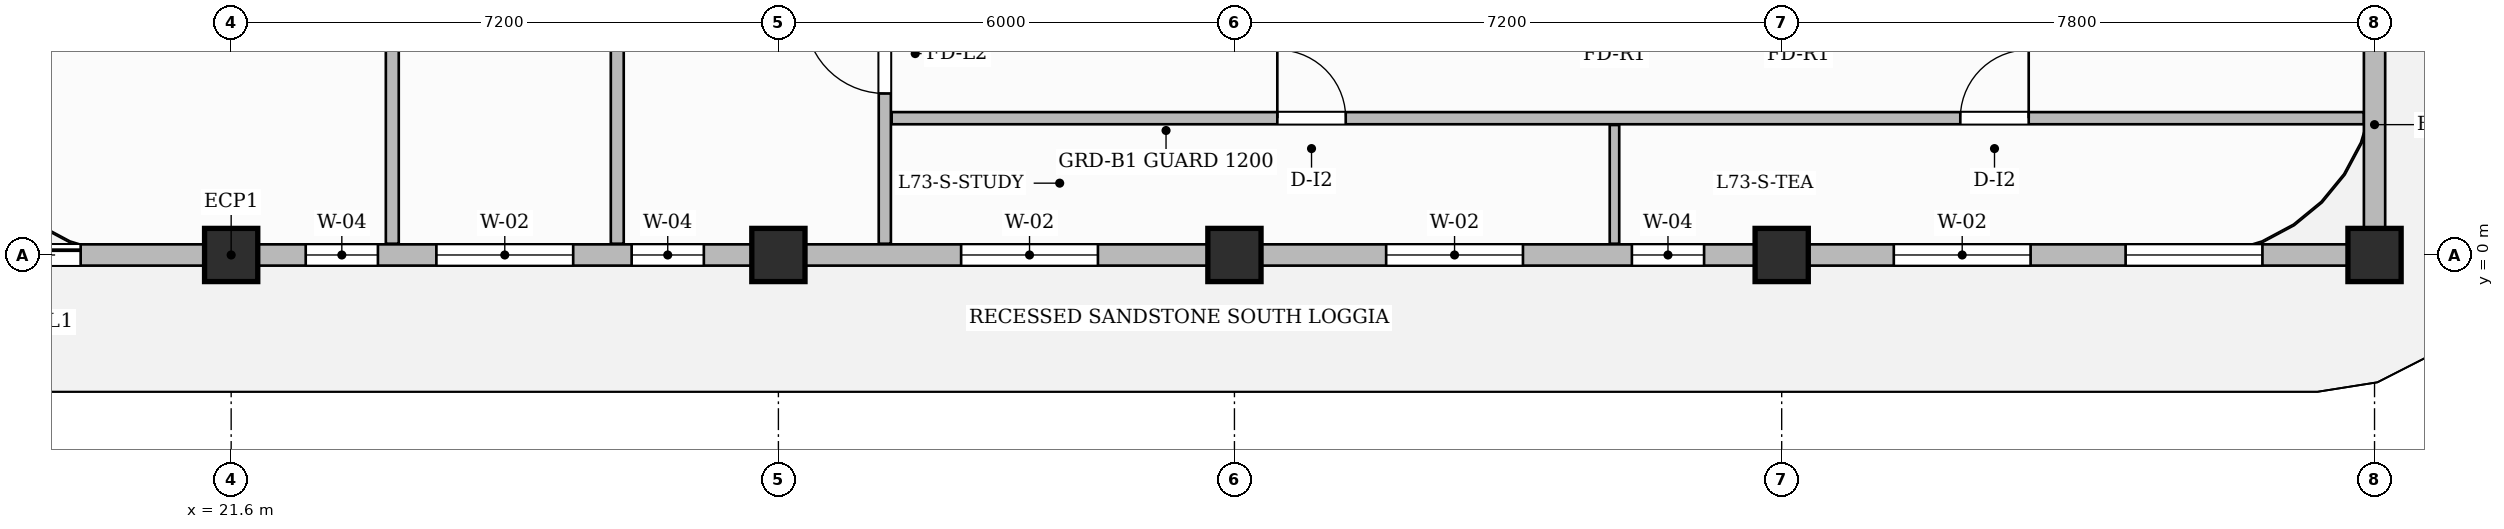
"""IFC4 building model, lengths in metres.
Left out: names, types, materials, properties, quantities, classifications, styles, units other than length and angle.
Written with IfcOpenShell. Run it as: python <this file> out.ifc"""

import sys

from ifc_helpers import new_model, si_unit, direction, frame, frame_2d, origin, origin_2d, place, context, subcontext, project, spatial, rectangle, extrude, source, transform, mapped, element, fill, save


model = new_model("IFC4")
c1 = context("Model", 3, precision=1e-05, world=origin(), true_north=direction((0.0, 1.0)))
c2 = subcontext(c1, "Body", "Model", "MODEL_VIEW")
j1 = project(units=[si_unit("LENGTHUNIT", "METRE"), si_unit("PLANEANGLEUNIT", "RADIAN")], contexts=[c1])
p1 = place(None, origin())
s1 = spatial("IfcSite", under=j1, at=p1, CompositionType="ELEMENT")
p2 = place(p1, origin())
s2 = spatial("IfcBuilding", under=s1, at=p2, CompositionType="ELEMENT")
p3 = place(p2, frame((0.0, 0.0, 290.45)))
s3 = spatial("IfcBuildingStorey", under=s2, at=p3, CompositionType="ELEMENT", Elevation=290.45)
m1 = source(origin(), c2, "Body", "SweptSolid", [
    extrude(rectangle(XDim=0.7, YDim=0.7, at=origin_2d()), origin(), (0.0, 0.0, 1.0), 3.85),
])
for number, where, z_axis, x_axis in (
    (1, (21.6, 0.0, 0.0), (0.0, 0.0, 1.0), (1.0, 0.0, 0.0)),
    (2, (28.8, 0.0, 0.0), (0.0, 0.0, 1.0), (1.0, 0.0, 0.0)),
    (3, (34.8, 0.0, 0.0), (0.0, 0.0, 1.0), (1.0, 0.0, 0.0)),
    (4, (42.0, 0.0, 0.0), (0.0, 0.0, 1.0), (1.0, 0.0, 0.0)),
    (5, (49.8, 0.0, 0.0), (0.0, 0.0, 1.0), (1.0, 0.0, 0.0)),
):
    element("IfcColumn", number, at=place(p3, frame(where, z_axis=z_axis, x_axis=x_axis)), inside=s3, PredefinedType="COLUMN", context=c2, shape_type="MappedRepresentation", body=[
        mapped(m1, transform((0.0, 0.0, 0.0), scale=1.0)),
    ])
p4 = place(p3, frame((30.2, 0.148, 0.0), z_axis=(0.0, 0.0, 1.0), x_axis=(0.0, 1.0, 0.0)))
e6 = element("IfcWall", 6, at=p4, inside=s3, PredefinedType="PARTITIONING", context=c2, shape_type="SweptSolid", body=[
    extrude(rectangle(XDim=8.912, YDim=0.16, at=frame_2d((4.456, 0.0))), origin(), (0.0, 0.0, 1.0), 3.55),
])
p5 = place(p4, frame((1.977, 0.0, 0.0)))
e7 = element("IfcOpeningElement", 7, at=p5, cuts=e6, PredefinedType="OPENING", context=c2, shape_type="SweptSolid", body=[
    extrude(rectangle(XDim=1.05, YDim=2.15, at=frame_2d((0.525, 1.075))), frame((0.0, 0.09, 0.0), z_axis=(0.0, -1.0, 0.0), x_axis=(1.0, 0.0, 0.0)), (0.0, 0.0, 1.0), 0.18),
])
p6 = place(p3, frame((30.29, 1.8, 0.0), z_axis=(0.0, 0.0, 1.0), x_axis=(1.0, 0.0, 0.0)))
e8 = element("IfcWall", 8, at=p6, inside=s3, PredefinedType="PARTITIONING", context=c2, shape_type="SweptSolid", body=[
    extrude(rectangle(XDim=19.37, YDim=0.16, at=frame_2d((9.685, 0.0))), origin(), (0.0, 0.0, 1.0), 3.55),
])
p7 = place(p6, frame((5.074, 0.0, 0.0)))
e9 = element("IfcOpeningElement", 9, at=p7, cuts=e8, PredefinedType="OPENING", context=c2, shape_type="SweptSolid", body=[
    extrude(rectangle(XDim=0.9, YDim=2.15, at=frame_2d((0.45, 1.075))), frame((0.0, 0.09, 0.0), z_axis=(0.0, -1.0, 0.0), x_axis=(1.0, 0.0, 0.0)), (0.0, 0.0, 1.0), 0.18),
])
p8 = place(p6, frame((14.06, 0.0, 0.0)))
e10 = element("IfcOpeningElement", 10, at=p8, cuts=e8, PredefinedType="OPENING", context=c2, shape_type="SweptSolid", body=[
    extrude(rectangle(XDim=0.9, YDim=2.15, at=frame_2d((0.45, 1.075))), frame((0.0, 0.09, 0.0), z_axis=(0.0, -1.0, 0.0), x_axis=(1.0, 0.0, 0.0)), (0.0, 0.0, 1.0), 0.18),
])
p9 = place(p3, frame((39.8, 0.148, 0.0), z_axis=(0.0, 0.0, 1.0), x_axis=(0.0, 1.0, 0.0)))
e11 = element("IfcWall", 11, at=p9, inside=s3, PredefinedType="PARTITIONING", context=c2, shape_type="SweptSolid", body=[
    extrude(rectangle(XDim=1.562, YDim=0.125, at=frame_2d((0.781, 0.0))), origin(), (0.0, 0.0, 1.0), 3.55),
])
for number, where, z_axis, x_axis in (
    (12, (23.72, 0.148, 0.0), (0.0, 0.0, 1.0), (0.0, 1.0, 0.0)),
    (13, (26.68, 0.148, 0.0), (0.0, 0.0, 1.0), (0.0, 1.0, 0.0)),
):
    element("IfcWall", number, at=place(p3, frame(where, z_axis=z_axis, x_axis=x_axis)), inside=s3, PredefinedType="PARTITIONING", context=c2, shape_type="SweptSolid", body=[
        extrude(rectangle(XDim=8.912, YDim=0.17, at=frame_2d((4.456, 0.0))), origin(), (0.0, 0.0, 1.0), 3.55),
    ])
p10 = place(p3, frame((18.0, 0.0, 0.0), z_axis=(0.0, 0.0, 1.0), x_axis=(1.0, 0.0, 0.0)))
e14 = element("IfcWall", 14, at=p10, inside=s3, PredefinedType="SOLIDWALL", context=c2, shape_type="SweptSolid", body=[
    extrude(rectangle(XDim=31.8, YDim=0.28, at=frame_2d((15.9, 0.0))), origin(), (0.0, 0.0, 1.0), 3.135),
])
p11 = place(p10, frame((0.42, 0.0, 0.0)))
e15 = element("IfcOpeningElement", 15, at=p11, cuts=e14, PredefinedType="OPENING", context=c2, shape_type="SweptSolid", body=[
    extrude(rectangle(XDim=1.2, YDim=2.2, at=frame_2d((0.6, 1.1))), frame((0.0, 0.15, 0.0), z_axis=(0.0, -1.0, 0.0), x_axis=(1.0, 0.0, 0.0)), (0.0, 0.0, 1.0), 0.3),
])
p12 = place(p10, frame((4.581, 0.0, 0.8)))
e16 = element("IfcOpeningElement", 16, at=p12, cuts=e14, PredefinedType="OPENING", context=c2, shape_type="SweptSolid", body=[
    extrude(rectangle(XDim=0.95, YDim=1.75, at=frame_2d((0.475, 0.875))), frame((0.0, 0.15, 0.0), z_axis=(0.0, -1.0, 0.0), x_axis=(1.0, 0.0, 0.0)), (0.0, 0.0, 1.0), 0.3),
])
p13 = place(p10, frame((6.3, 0.0, 0.8)))
e17 = element("IfcOpeningElement", 17, at=p13, cuts=e14, PredefinedType="OPENING", context=c2, shape_type="SweptSolid", body=[
    extrude(rectangle(XDim=1.8, YDim=1.85, at=frame_2d((0.9, 0.925))), frame((0.0, 0.15, 0.0), z_axis=(0.0, -1.0, 0.0), x_axis=(1.0, 0.0, 0.0)), (0.0, 0.0, 1.0), 0.3),
])
p14 = place(p10, frame((8.869, 0.0, 0.8)))
e18 = element("IfcOpeningElement", 18, at=p14, cuts=e14, PredefinedType="OPENING", context=c2, shape_type="SweptSolid", body=[
    extrude(rectangle(XDim=0.95, YDim=1.75, at=frame_2d((0.475, 0.875))), frame((0.0, 0.15, 0.0), z_axis=(0.0, -1.0, 0.0), x_axis=(1.0, 0.0, 0.0)), (0.0, 0.0, 1.0), 0.3),
])
p15 = place(p10, frame((13.204, 0.0, 0.8)))
e19 = element("IfcOpeningElement", 19, at=p15, cuts=e14, PredefinedType="OPENING", context=c2, shape_type="SweptSolid", body=[
    extrude(rectangle(XDim=1.8, YDim=1.85, at=frame_2d((0.9, 0.925))), frame((0.0, 0.15, 0.0), z_axis=(0.0, -1.0, 0.0), x_axis=(1.0, 0.0, 0.0)), (0.0, 0.0, 1.0), 0.3),
])
p16 = place(p10, frame((18.796, 0.0, 0.8)))
e20 = element("IfcOpeningElement", 20, at=p16, cuts=e14, PredefinedType="OPENING", context=c2, shape_type="SweptSolid", body=[
    extrude(rectangle(XDim=1.8, YDim=1.85, at=frame_2d((0.9, 0.925))), frame((0.0, 0.15, 0.0), z_axis=(0.0, -1.0, 0.0), x_axis=(1.0, 0.0, 0.0)), (0.0, 0.0, 1.0), 0.3),
])
p17 = place(p10, frame((22.029, 0.0, 0.8)))
e21 = element("IfcOpeningElement", 21, at=p17, cuts=e14, PredefinedType="OPENING", context=c2, shape_type="SweptSolid", body=[
    extrude(rectangle(XDim=0.95, YDim=1.75, at=frame_2d((0.475, 0.875))), frame((0.0, 0.15, 0.0), z_axis=(0.0, -1.0, 0.0), x_axis=(1.0, 0.0, 0.0)), (0.0, 0.0, 1.0), 0.3),
])
p18 = place(p10, frame((25.475, 0.0, 0.8)))
e22 = element("IfcOpeningElement", 22, at=p18, cuts=e14, PredefinedType="OPENING", context=c2, shape_type="SweptSolid", body=[
    extrude(rectangle(XDim=1.8, YDim=1.85, at=frame_2d((0.9, 0.925))), frame((0.0, 0.15, 0.0), z_axis=(0.0, -1.0, 0.0), x_axis=(1.0, 0.0, 0.0)), (0.0, 0.0, 1.0), 0.3),
])
p19 = place(p10, frame((28.525, 0.0, 0.8)))
e23 = element("IfcOpeningElement", 23, at=p19, cuts=e14, PredefinedType="OPENING", context=c2, shape_type="SweptSolid", body=[
    extrude(rectangle(XDim=1.8, YDim=1.85, at=frame_2d((0.9, 0.925))), frame((0.0, 0.15, 0.0), z_axis=(0.0, -1.0, 0.0), x_axis=(1.0, 0.0, 0.0)), (0.0, 0.0, 1.0), 0.3),
])
p20 = place(p3, frame((49.8, 0.05, 0.0), z_axis=(0.0, 0.0, 1.0), x_axis=(0.0, 1.0, 0.0)))
e24 = element("IfcWall", 24, at=p20, inside=s3, PredefinedType="SOLIDWALL", context=c2, shape_type="SweptSolid", body=[
    extrude(rectangle(XDim=3.33, YDim=0.28, at=frame_2d((1.665, 0.0))), origin(), (0.0, 0.0, 1.0), 3.55),
])
m2 = source(origin(), c2, "Body", "SweptSolid", [
    extrude(rectangle(XDim=1.05, YDim=2.15, at=frame_2d((0.525, 1.075))), frame((0.0, 0.025, 0.0), z_axis=(0.0, -1.0, 0.0), x_axis=(1.0, 0.0, 0.0)), (0.0, 0.0, 1.0), 0.05),
])
p21 = place(p5, origin())
e25 = element("IfcDoor", 25, at=p21, inside=s3, OperationType="SINGLE_SWING_RIGHT", PredefinedType="DOOR", context=c2, shape_type="MappedRepresentation", body=[
    mapped(m2, transform((0.0, 0.0, 0.0), scale=1.0)),
])
fill(e7, e25)
m3 = source(origin(), c2, "Body", "SweptSolid", [
    extrude(rectangle(XDim=0.9, YDim=2.15, at=frame_2d((0.45, 1.075))), frame((0.0, 0.025, 0.0), z_axis=(0.0, -1.0, 0.0), x_axis=(1.0, 0.0, 0.0)), (0.0, 0.0, 1.0), 0.05),
])
p22 = place(p7, origin())
e26 = element("IfcDoor", 26, at=p22, inside=s3, OperationType="SINGLE_SWING_LEFT", PredefinedType="DOOR", context=c2, shape_type="MappedRepresentation", body=[
    mapped(m3, transform((0.0, 0.0, 0.0), scale=1.0)),
])
fill(e9, e26)
p23 = place(p8, origin())
e27 = element("IfcDoor", 27, at=p23, inside=s3, OperationType="SINGLE_SWING_RIGHT", PredefinedType="DOOR", context=c2, shape_type="MappedRepresentation", body=[
    mapped(m3, transform((0.0, 0.0, 0.0), scale=1.0)),
])
fill(e10, e27)
m4 = source(origin(), c2, "Body", "SweptSolid", [
    extrude(rectangle(XDim=1.2, YDim=2.2, at=frame_2d((0.6, 1.1))), frame((0.0, 0.025, 0.0), z_axis=(0.0, -1.0, 0.0), x_axis=(1.0, 0.0, 0.0)), (0.0, 0.0, 1.0), 0.05),
])
p24 = place(p11, origin())
e28 = element("IfcDoor", 28, at=p24, inside=s3, OperationType="SLIDING_TO_LEFT", PredefinedType="DOOR", context=c2, shape_type="MappedRepresentation", body=[
    mapped(m4, transform((0.0, 0.0, 0.0), scale=1.0)),
])
fill(e15, e28)
m5 = source(origin(), c2, "Body", "SweptSolid", [
    extrude(rectangle(XDim=0.95, YDim=1.75, at=frame_2d((0.475, 0.875))), frame((0.0, 0.03, 0.0), z_axis=(0.0, -1.0, 0.0), x_axis=(1.0, 0.0, 0.0)), (0.0, 0.0, 1.0), 0.06),
])
p25 = place(p12, origin())
e29 = element("IfcWindow", 29, at=p25, inside=s3, PartitioningType="SINGLE_PANEL", PredefinedType="WINDOW", context=c2, shape_type="MappedRepresentation", body=[
    mapped(m5, transform((0.0, 0.0, 0.0), scale=1.0)),
])
fill(e16, e29)
m6 = source(origin(), c2, "Body", "SweptSolid", [
    extrude(rectangle(XDim=1.8, YDim=1.85, at=frame_2d((0.9, 0.925))), frame((0.0, 0.03, 0.0), z_axis=(0.0, -1.0, 0.0), x_axis=(1.0, 0.0, 0.0)), (0.0, 0.0, 1.0), 0.06),
])
p26 = place(p13, origin())
e30 = element("IfcWindow", 30, at=p26, inside=s3, PartitioningType="DOUBLE_PANEL_VERTICAL", PredefinedType="WINDOW", context=c2, shape_type="MappedRepresentation", body=[
    mapped(m6, transform((0.0, 0.0, 0.0), scale=1.0)),
])
fill(e17, e30)
p27 = place(p14, origin())
e31 = element("IfcWindow", 31, at=p27, inside=s3, PartitioningType="SINGLE_PANEL", PredefinedType="WINDOW", context=c2, shape_type="MappedRepresentation", body=[
    mapped(m5, transform((0.0, 0.0, 0.0), scale=1.0)),
])
fill(e18, e31)
p28 = place(p15, origin())
e32 = element("IfcWindow", 32, at=p28, inside=s3, PartitioningType="DOUBLE_PANEL_VERTICAL", PredefinedType="WINDOW", context=c2, shape_type="MappedRepresentation", body=[
    mapped(m6, transform((0.0, 0.0, 0.0), scale=1.0)),
])
fill(e19, e32)
p29 = place(p16, origin())
e33 = element("IfcWindow", 33, at=p29, inside=s3, PartitioningType="DOUBLE_PANEL_VERTICAL", PredefinedType="WINDOW", context=c2, shape_type="MappedRepresentation", body=[
    mapped(m6, transform((0.0, 0.0, 0.0), scale=1.0)),
])
fill(e20, e33)
p30 = place(p17, origin())
e34 = element("IfcWindow", 34, at=p30, inside=s3, PartitioningType="SINGLE_PANEL", PredefinedType="WINDOW", context=c2, shape_type="MappedRepresentation", body=[
    mapped(m5, transform((0.0, 0.0, 0.0), scale=1.0)),
])
fill(e21, e34)
p31 = place(p18, origin())
e35 = element("IfcWindow", 35, at=p31, inside=s3, PartitioningType="DOUBLE_PANEL_VERTICAL", PredefinedType="WINDOW", context=c2, shape_type="MappedRepresentation", body=[
    mapped(m6, transform((0.0, 0.0, 0.0), scale=1.0)),
])
fill(e22, e35)
p32 = place(p19, origin())
e36 = element("IfcWindow", 36, at=p32, inside=s3, PartitioningType="DOUBLE_PANEL_VERTICAL", PredefinedType="WINDOW", context=c2, shape_type="MappedRepresentation", body=[
    mapped(m6, transform((0.0, 0.0, 0.0), scale=1.0)),
])
fill(e23, e36)
save(model, sys.argv[1])
